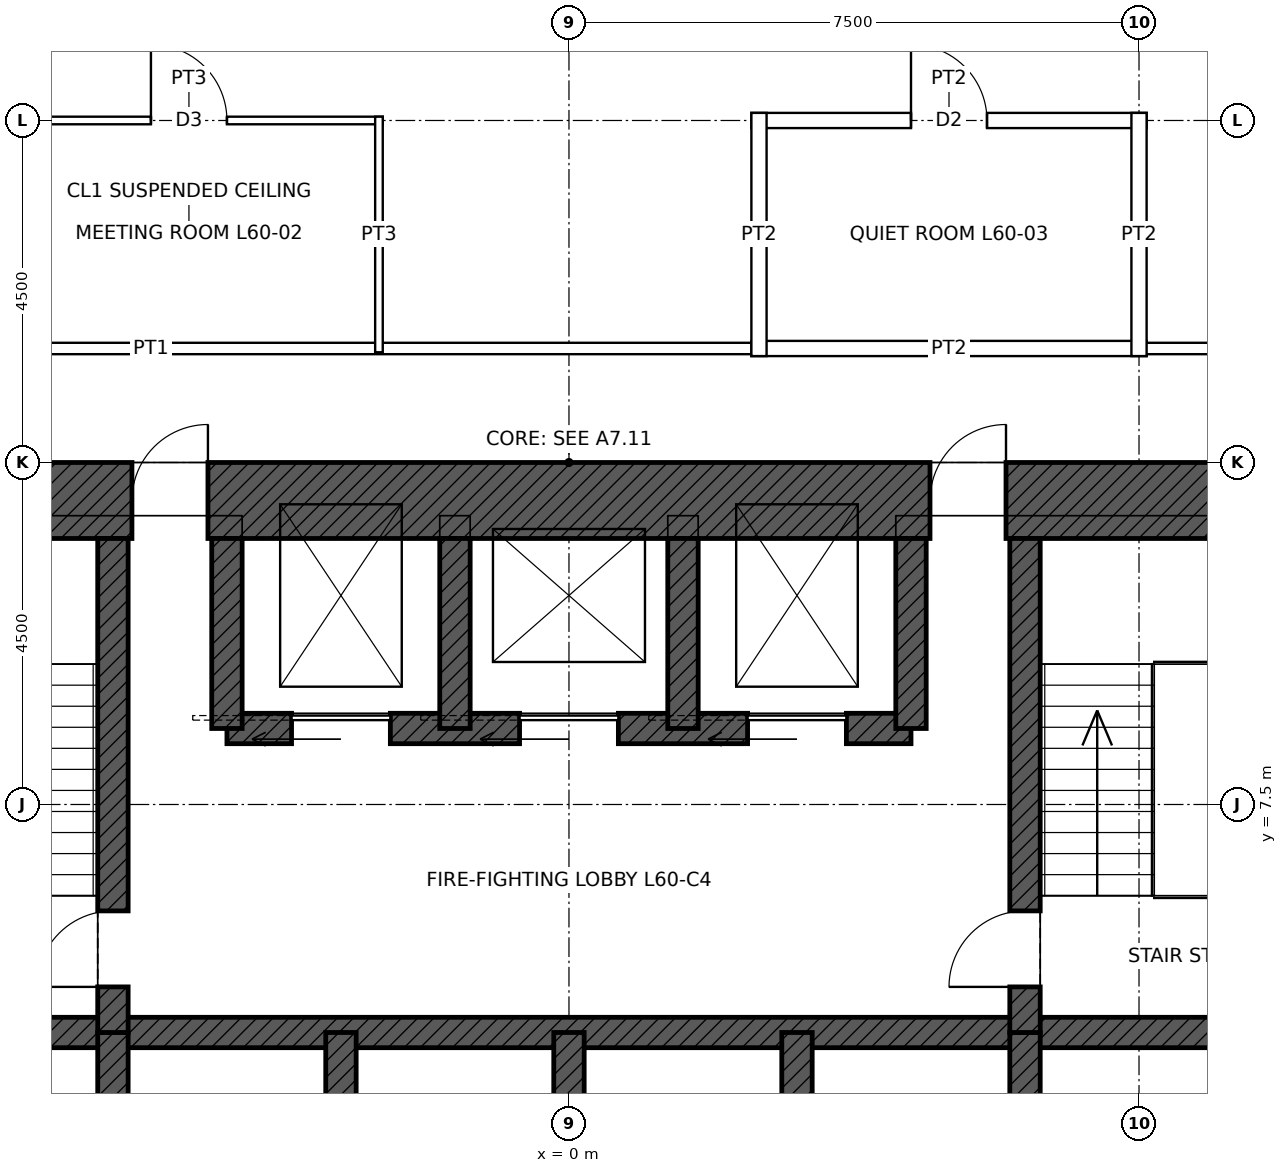
"""IFC4 building model, lengths in metres.
Left out: names, types, materials, properties, quantities, classifications, styles, units other than length and angle.
Written with IfcOpenShell. Run it as: python <this file> out.ifc"""

import sys

from ifc_helpers import new_model, si_unit, direction, frame, frame_2d, origin, place, context, subcontext, project, spatial, rectangle, extrude, element, fill, save


model = new_model("IFC4")
c1 = context("Model", 3, precision=1e-05, world=origin(), true_north=direction((0.0, 1.0)))
c2 = subcontext(c1, "Body", "Model", "MODEL_VIEW")
j1 = project(units=[si_unit("LENGTHUNIT", "METRE"), si_unit("PLANEANGLEUNIT", "RADIAN")], contexts=[c1])
p1 = place(None, origin())
s1 = spatial("IfcSite", under=j1, at=p1, CompositionType="ELEMENT")
p2 = place(p1, origin())
s2 = spatial("IfcBuilding", under=s1, at=p2, CompositionType="ELEMENT")
p3 = place(p2, frame((0.0, 0.0, 275.9)))
s3 = spatial("IfcBuildingStorey", under=s2, at=p3, CompositionType="ELEMENT", Elevation=275.9)
p4 = place(p3, frame((-12.0, 11.5, 0.0), z_axis=(0.0, 0.0, 1.0), x_axis=(1.0, 0.0, 0.0)))
e1 = element("IfcWall", 1, at=p4, inside=s3, PredefinedType="SHEAR", context=c2, shape_type="SweptSolid", body=[
    extrude(rectangle(XDim=24.0, YDim=1.0, at=frame_2d((12.0, 0.0))), origin(), (0.0, 0.0, 1.0), 4.0),
])
p5 = place(p4, frame((6.25, 0.0, 0.0)))
e2 = element("IfcOpeningElement", 2, at=p5, cuts=e1, PredefinedType="OPENING", context=c2, shape_type="SweptSolid", body=[
    extrude(rectangle(XDim=1.0, YDim=2.4, at=frame_2d((0.5, 1.2))), frame((0.0, 0.51, 0.0), z_axis=(0.0, -1.0, 0.0), x_axis=(1.0, 0.0, 0.0)), (0.0, 0.0, 1.0), 1.02),
])
p6 = place(p4, frame((16.75, 0.0, 0.0)))
e3 = element("IfcOpeningElement", 3, at=p6, cuts=e1, PredefinedType="OPENING", context=c2, shape_type="SweptSolid", body=[
    extrude(rectangle(XDim=1.0, YDim=2.4, at=frame_2d((0.5, 1.2))), frame((0.0, 0.51, 0.0), z_axis=(0.0, -1.0, 0.0), x_axis=(1.0, 0.0, 0.0)), (0.0, 0.0, 1.0), 1.02),
])
p7 = place(p3, frame((-11.0, 4.5, 0.0), z_axis=(0.0, 0.0, 1.0), x_axis=(1.0, 0.0, 0.0)))
e4 = element("IfcWall", 4, at=p7, inside=s3, PredefinedType="SHEAR", context=c2, shape_type="SweptSolid", body=[
    extrude(rectangle(XDim=22.0, YDim=0.4, at=frame_2d((11.0, 0.0))), origin(), (0.0, 0.0, 1.0), 4.0),
])
p8 = place(p7, frame((0.4, 0.0, 0.0)))
e5 = element("IfcOpeningElement", 5, at=p8, cuts=e4, PredefinedType="OPENING", context=c2, shape_type="SweptSolid", body=[
    extrude(rectangle(XDim=1.0, YDim=2.1, at=frame_2d((0.5, 1.05))), frame((0.0, 0.21, 0.0), z_axis=(0.0, -1.0, 0.0), x_axis=(1.0, 0.0, 0.0)), (0.0, 0.0, 1.0), 0.42),
])
p9 = place(p7, frame((20.6, 0.0, 0.0)))
e6 = element("IfcOpeningElement", 6, at=p9, cuts=e4, PredefinedType="OPENING", context=c2, shape_type="SweptSolid", body=[
    extrude(rectangle(XDim=1.0, YDim=2.1, at=frame_2d((0.5, 1.05))), frame((0.0, 0.21, 0.0), z_axis=(0.0, -1.0, 0.0), x_axis=(1.0, 0.0, 0.0)), (0.0, 0.0, 1.0), 0.42),
])
p10 = place(p3, frame((-4.5, 8.5, 0.0), z_axis=(0.0, 0.0, 1.0), x_axis=(1.0, 0.0, 0.0)))
e7 = element("IfcWall", 7, at=p10, inside=s3, PredefinedType="SHEAR", context=c2, shape_type="SweptSolid", body=[
    extrude(rectangle(XDim=9.0, YDim=0.4, at=frame_2d((4.5, 0.0))), origin(), (0.0, 0.0, 1.0), 4.0),
])
p11 = place(p10, frame((0.85, 0.0, 0.0)))
e8 = element("IfcOpeningElement", 8, at=p11, cuts=e7, PredefinedType="OPENING", context=c2, shape_type="SweptSolid", body=[
    extrude(rectangle(XDim=1.3, YDim=2.4, at=frame_2d((0.65, 1.2))), frame((0.0, 0.21, 0.0), z_axis=(0.0, -1.0, 0.0), x_axis=(1.0, 0.0, 0.0)), (0.0, 0.0, 1.0), 0.42),
])
p12 = place(p10, frame((6.85, 0.0, 0.0)))
e9 = element("IfcOpeningElement", 9, at=p12, cuts=e7, PredefinedType="OPENING", context=c2, shape_type="SweptSolid", body=[
    extrude(rectangle(XDim=1.3, YDim=2.4, at=frame_2d((0.65, 1.2))), frame((0.0, 0.21, 0.0), z_axis=(0.0, -1.0, 0.0), x_axis=(1.0, 0.0, 0.0)), (0.0, 0.0, 1.0), 0.42),
])
p13 = place(p10, frame((3.85, 0.0, 0.0)))
e10 = element("IfcOpeningElement", 10, at=p13, cuts=e7, PredefinedType="OPENING", context=c2, shape_type="SweptSolid", body=[
    extrude(rectangle(XDim=1.3, YDim=2.4, at=frame_2d((0.65, 1.2))), frame((0.0, 0.21, 0.0), z_axis=(0.0, -1.0, 0.0), x_axis=(1.0, 0.0, 0.0)), (0.0, 0.0, 1.0), 0.42),
])
for number, where, z_axis, x_axis in (
    (11, (-6.0, 1.5, 0.0), (0.0, 0.0, 1.0), (0.0, 1.0, 0.0)),
    (12, (-3.0, 1.5, 0.0), (0.0, 0.0, 1.0), (0.0, 1.0, 0.0)),
    (13, (0.0, 1.5, 0.0), (0.0, 0.0, 1.0), (0.0, 1.0, 0.0)),
    (14, (3.0, 1.5, 0.0), (0.0, 0.0, 1.0), (0.0, 1.0, 0.0)),
    (15, (6.0, 1.5, 0.0), (0.0, 0.0, 1.0), (0.0, 1.0, 0.0)),
):
    element("IfcWall", number, at=place(p3, frame(where, z_axis=z_axis, x_axis=x_axis)), inside=s3, PredefinedType="SHEAR", context=c2, shape_type="SweptSolid", body=[
        extrude(rectangle(XDim=3.0, YDim=0.4, at=frame_2d((1.5, 0.0))), origin(), (0.0, 0.0, 1.0), 4.0),
    ])
p14 = place(p3, frame((-6.0, 4.5, 0.0), z_axis=(0.0, 0.0, 1.0), x_axis=(0.0, 1.0, 0.0)))
e16 = element("IfcWall", 16, at=p14, inside=s3, PredefinedType="SHEAR", context=c2, shape_type="SweptSolid", body=[
    extrude(rectangle(XDim=6.5, YDim=0.4, at=frame_2d((3.25, 0.0))), origin(), (0.0, 0.0, 1.0), 4.0),
])
p15 = place(p14, frame((0.6, 0.0, 0.0)))
e17 = element("IfcOpeningElement", 17, at=p15, cuts=e16, PredefinedType="OPENING", context=c2, shape_type="SweptSolid", body=[
    extrude(rectangle(XDim=1.0, YDim=2.1, at=frame_2d((0.5, 1.05))), frame((0.0, 0.21, 0.0), z_axis=(0.0, -1.0, 0.0), x_axis=(1.0, 0.0, 0.0)), (0.0, 0.0, 1.0), 0.42),
])
p16 = place(p3, frame((6.0, 4.5, 0.0), z_axis=(0.0, 0.0, 1.0), x_axis=(0.0, 1.0, 0.0)))
e18 = element("IfcWall", 18, at=p16, inside=s3, PredefinedType="SHEAR", context=c2, shape_type="SweptSolid", body=[
    extrude(rectangle(XDim=6.5, YDim=0.4, at=frame_2d((3.25, 0.0))), origin(), (0.0, 0.0, 1.0), 4.0),
])
p17 = place(p16, frame((0.6, 0.0, 0.0)))
e19 = element("IfcOpeningElement", 19, at=p17, cuts=e18, PredefinedType="OPENING", context=c2, shape_type="SweptSolid", body=[
    extrude(rectangle(XDim=1.0, YDim=2.1, at=frame_2d((0.5, 1.05))), frame((0.0, 0.21, 0.0), z_axis=(0.0, -1.0, 0.0), x_axis=(1.0, 0.0, 0.0)), (0.0, 0.0, 1.0), 0.42),
])
for number, where, z_axis, x_axis in (
    (20, (-4.5, 8.5, 0.0), (0.0, 0.0, 1.0), (0.0, 1.0, 0.0)),
    (21, (4.5, 8.5, 0.0), (0.0, 0.0, 1.0), (0.0, 1.0, 0.0)),
    (22, (-1.5, 8.5, 0.0), (0.0, 0.0, 1.0), (0.0, 1.0, 0.0)),
    (23, (1.5, 8.5, 0.0), (0.0, 0.0, 1.0), (0.0, 1.0, 0.0)),
):
    element("IfcWall", number, at=place(p3, frame(where, z_axis=z_axis, x_axis=x_axis)), inside=s3, PredefinedType="SHEAR", context=c2, shape_type="SweptSolid", body=[
        extrude(rectangle(XDim=2.5, YDim=0.4, at=frame_2d((1.25, 0.0))), origin(), (0.0, 0.0, 1.0), 4.0),
    ])
p18 = place(p3, frame((-13.575, 13.5, 0.0), z_axis=(0.0, 0.0, 1.0), x_axis=(1.0, 0.0, 0.0)))
e24 = element("IfcWall", 24, at=p18, inside=s3, PredefinedType="PARTITIONING", context=c2, shape_type="SweptSolid", body=[
    extrude(rectangle(XDim=16.15, YDim=0.15, at=frame_2d((8.075, 0.0))), origin(), (0.0, 0.0, 1.0), 3.85),
])
p19 = place(p3, frame((2.4, 13.5, 0.0), z_axis=(0.0, 0.0, 1.0), x_axis=(1.0, 0.0, 0.0)))
e25 = element("IfcWall", 25, at=p19, inside=s3, PredefinedType="PARTITIONING", context=c2, shape_type="SweptSolid", body=[
    extrude(rectangle(XDim=5.2, YDim=0.2, at=frame_2d((2.6, 0.0))), origin(), (0.0, 0.0, 1.0), 3.85),
])
p20 = place(p3, frame((7.425, 13.5, 0.0), z_axis=(0.0, 0.0, 1.0), x_axis=(1.0, 0.0, 0.0)))
e26 = element("IfcWall", 26, at=p20, inside=s3, PredefinedType="PARTITIONING", context=c2, shape_type="SweptSolid", body=[
    extrude(rectangle(XDim=6.15, YDim=0.15, at=frame_2d((3.075, 0.0))), origin(), (0.0, 0.0, 1.0), 3.85),
])
p21 = place(p3, frame((-7.55, 16.5, 0.0), z_axis=(0.0, 0.0, 1.0), x_axis=(1.0, 0.0, 0.0)))
e27 = element("IfcWall", 27, at=p21, inside=s3, PredefinedType="PARTITIONING", context=c2, shape_type="SweptSolid", body=[
    extrude(rectangle(XDim=5.1, YDim=0.1, at=frame_2d((2.55, 0.0))), origin(), (0.0, 0.0, 1.0), 3.85),
])
p22 = place(p21, frame((2.05, 0.0, 0.0)))
e28 = element("IfcOpeningElement", 28, at=p22, cuts=e27, PredefinedType="OPENING", context=c2, shape_type="SweptSolid", body=[
    extrude(rectangle(XDim=1.0, YDim=2.1, at=frame_2d((0.5, 1.05))), frame((0.0, 0.06, 0.0), z_axis=(0.0, -1.0, 0.0), x_axis=(1.0, 0.0, 0.0)), (0.0, 0.0, 1.0), 0.12),
])
p23 = place(p3, frame((2.4, 16.5, 0.0), z_axis=(0.0, 0.0, 1.0), x_axis=(1.0, 0.0, 0.0)))
e29 = element("IfcWall", 29, at=p23, inside=s3, PredefinedType="PARTITIONING", context=c2, shape_type="SweptSolid", body=[
    extrude(rectangle(XDim=5.2, YDim=0.2, at=frame_2d((2.6, 0.0))), origin(), (0.0, 0.0, 1.0), 3.85),
])
p24 = place(p23, frame((2.1, 0.0, 0.0)))
e30 = element("IfcOpeningElement", 30, at=p24, cuts=e29, PredefinedType="OPENING", context=c2, shape_type="SweptSolid", body=[
    extrude(rectangle(XDim=1.0, YDim=2.1, at=frame_2d((0.5, 1.05))), frame((0.0, 0.11, 0.0), z_axis=(0.0, -1.0, 0.0), x_axis=(1.0, 0.0, 0.0)), (0.0, 0.0, 1.0), 0.22),
])
p25 = place(p3, frame((-2.5, 13.45, 0.0), z_axis=(0.0, 0.0, 1.0), x_axis=(0.0, 1.0, 0.0)))
e31 = element("IfcWall", 31, at=p25, inside=s3, PredefinedType="PARTITIONING", context=c2, shape_type="SweptSolid", body=[
    extrude(rectangle(XDim=3.1, YDim=0.1, at=frame_2d((1.55, 0.0))), origin(), (0.0, 0.0, 1.0), 3.85),
])
p26 = place(p3, frame((2.5, 13.4, 0.0), z_axis=(0.0, 0.0, 1.0), x_axis=(0.0, 1.0, 0.0)))
e32 = element("IfcWall", 32, at=p26, inside=s3, PredefinedType="PARTITIONING", context=c2, shape_type="SweptSolid", body=[
    extrude(rectangle(XDim=3.2, YDim=0.2, at=frame_2d((1.6, 0.0))), origin(), (0.0, 0.0, 1.0), 3.85),
])
p27 = place(p3, frame((7.5, 13.4, 0.0), z_axis=(0.0, 0.0, 1.0), x_axis=(0.0, 1.0, 0.0)))
e33 = element("IfcWall", 33, at=p27, inside=s3, PredefinedType="PARTITIONING", context=c2, shape_type="SweptSolid", body=[
    extrude(rectangle(XDim=3.2, YDim=0.2, at=frame_2d((1.6, 0.0))), origin(), (0.0, 0.0, 1.0), 3.243),
])
p28 = place(p15, origin())
e34 = element("IfcDoor", 34, at=p28, inside=s3, OperationType="SINGLE_SWING_LEFT", PredefinedType="DOOR", context=c2, shape_type="SweptSolid", body=[
    extrude(rectangle(XDim=1.0, YDim=2.1, at=frame_2d((0.5, 1.05))), frame((0.0, 0.025, 0.0), z_axis=(0.0, -1.0, 0.0), x_axis=(1.0, 0.0, 0.0)), (0.0, 0.0, 1.0), 0.05),
])
fill(e17, e34)
p29 = place(p17, origin())
e35 = element("IfcDoor", 35, at=p29, inside=s3, OperationType="SINGLE_SWING_LEFT", PredefinedType="DOOR", context=c2, shape_type="SweptSolid", body=[
    extrude(rectangle(XDim=1.0, YDim=2.1, at=frame_2d((0.5, 1.05))), frame((0.0, 0.025, 0.0), z_axis=(0.0, -1.0, 0.0), x_axis=(1.0, 0.0, 0.0)), (0.0, 0.0, 1.0), 0.05),
])
fill(e19, e35)
p30 = place(p5, origin())
e36 = element("IfcDoor", 36, at=p30, inside=s3, OperationType="SINGLE_SWING_RIGHT", PredefinedType="DOOR", context=c2, shape_type="SweptSolid", body=[
    extrude(rectangle(XDim=1.0, YDim=2.4, at=frame_2d((0.5, 1.2))), frame((0.0, 0.485, 0.0), z_axis=(0.0, -1.0, 0.0), x_axis=(1.0, 0.0, 0.0)), (0.0, 0.0, 1.0), 0.05),
])
fill(e2, e36)
p31 = place(p6, origin())
e37 = element("IfcDoor", 37, at=p31, inside=s3, OperationType="SINGLE_SWING_RIGHT", PredefinedType="DOOR", context=c2, shape_type="SweptSolid", body=[
    extrude(rectangle(XDim=1.0, YDim=2.4, at=frame_2d((0.5, 1.2))), frame((0.0, 0.485, 0.0), z_axis=(0.0, -1.0, 0.0), x_axis=(1.0, 0.0, 0.0)), (0.0, 0.0, 1.0), 0.05),
])
fill(e3, e37)
p32 = place(p11, origin())
e38 = element("IfcDoor", 38, at=p32, inside=s3, OperationType="SLIDING_TO_LEFT", PredefinedType="DOOR", context=c2, shape_type="SweptSolid", body=[
    extrude(rectangle(XDim=1.3, YDim=2.4, at=frame_2d((0.65, 1.2))), frame((0.0, 0.025, 0.0), z_axis=(0.0, -1.0, 0.0), x_axis=(1.0, 0.0, 0.0)), (0.0, 0.0, 1.0), 0.05),
])
fill(e8, e38)
p33 = place(p12, origin())
e39 = element("IfcDoor", 39, at=p33, inside=s3, OperationType="SLIDING_TO_LEFT", PredefinedType="DOOR", context=c2, shape_type="SweptSolid", body=[
    extrude(rectangle(XDim=1.3, YDim=2.4, at=frame_2d((0.65, 1.2))), frame((0.0, 0.025, 0.0), z_axis=(0.0, -1.0, 0.0), x_axis=(1.0, 0.0, 0.0)), (0.0, 0.0, 1.0), 0.05),
])
fill(e9, e39)
p34 = place(p13, origin())
e40 = element("IfcDoor", 40, at=p34, inside=s3, OperationType="SLIDING_TO_LEFT", PredefinedType="DOOR", context=c2, shape_type="SweptSolid", body=[
    extrude(rectangle(XDim=1.3, YDim=2.4, at=frame_2d((0.65, 1.2))), frame((0.0, 0.025, 0.0), z_axis=(0.0, -1.0, 0.0), x_axis=(1.0, 0.0, 0.0)), (0.0, 0.0, 1.0), 0.05),
])
fill(e10, e40)
p35 = place(p22, origin())
e41 = element("IfcDoor", 41, at=p35, inside=s3, OperationType="SINGLE_SWING_LEFT", PredefinedType="DOOR", context=c2, shape_type="SweptSolid", body=[
    extrude(rectangle(XDim=1.0, YDim=2.1, at=frame_2d((0.5, 1.05))), frame((0.0, 0.025, 0.0), z_axis=(0.0, -1.0, 0.0), x_axis=(1.0, 0.0, 0.0)), (0.0, 0.0, 1.0), 0.05),
])
fill(e28, e41)
p36 = place(p24, origin())
e42 = element("IfcDoor", 42, at=p36, inside=s3, OperationType="SINGLE_SWING_LEFT", PredefinedType="DOOR", context=c2, shape_type="SweptSolid", body=[
    extrude(rectangle(XDim=1.0, YDim=2.1, at=frame_2d((0.5, 1.05))), frame((0.0, 0.025, 0.0), z_axis=(0.0, -1.0, 0.0), x_axis=(1.0, 0.0, 0.0)), (0.0, 0.0, 1.0), 0.05),
])
fill(e30, e42)
save(model, sys.argv[1])
